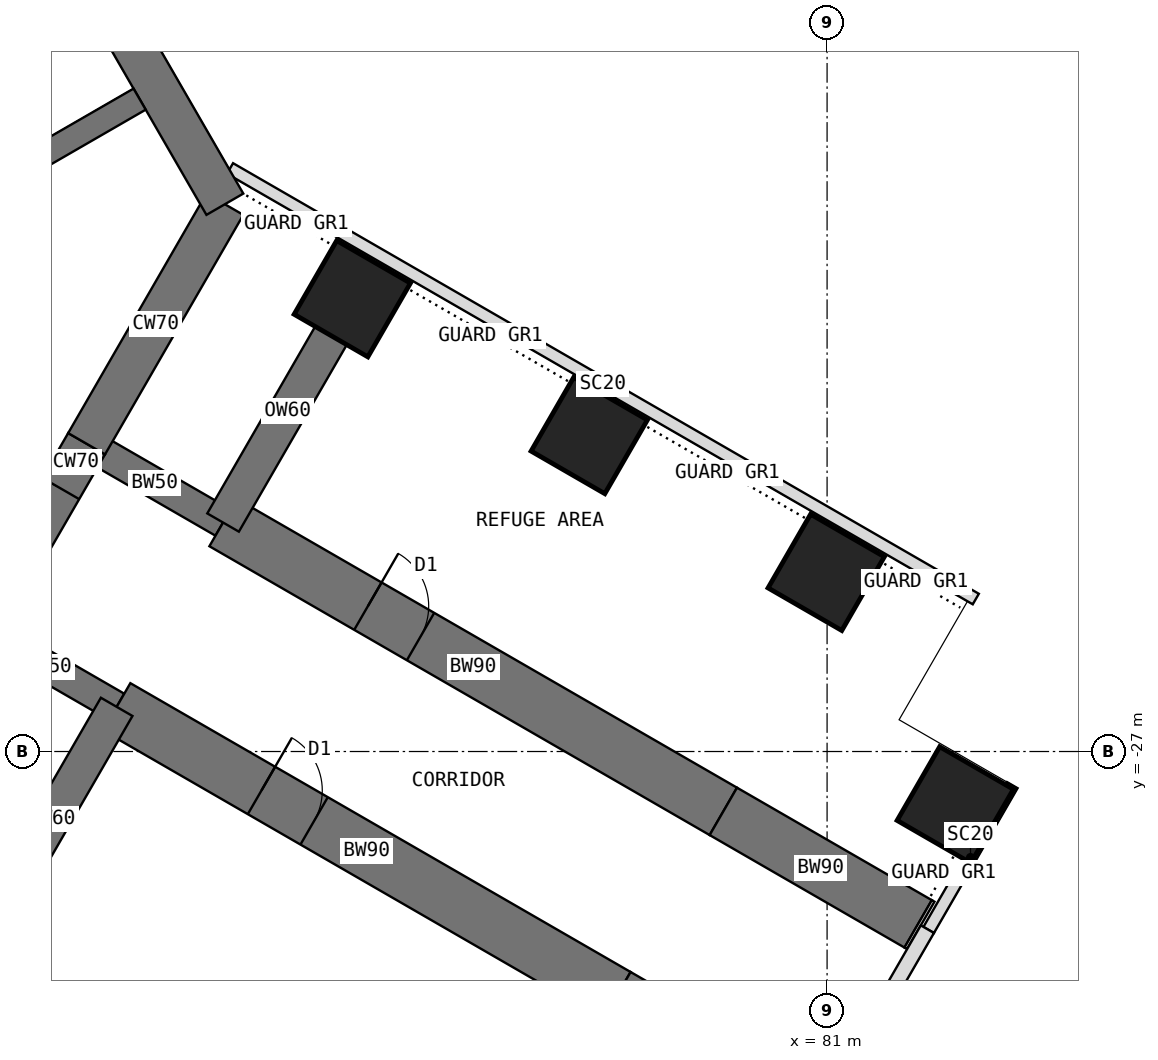
"""IFC4 building model, lengths in metres.
Left out: names, types, materials, properties, quantities, classifications, styles, units other than length and angle.
Written with IfcOpenShell. Run it as: python <this file> out.ifc"""

import sys

from ifc_helpers import new_model, si_unit, direction, frame, frame_2d, origin, origin_2d, place, context, subcontext, project, spatial, rectangle, extrude, element, fill, save


model = new_model("IFC4")
c1 = context("Model", 3, precision=1e-05, world=origin(), true_north=direction((0.0, 1.0)))
c2 = subcontext(c1, "Body", "Model", "MODEL_VIEW")
j1 = project(units=[si_unit("LENGTHUNIT", "METRE"), si_unit("PLANEANGLEUNIT", "RADIAN")], contexts=[c1])
p1 = place(None, origin())
s1 = spatial("IfcSite", under=j1, at=p1, CompositionType="ELEMENT")
p2 = place(p1, origin())
s2 = spatial("IfcBuilding", under=s1, at=p2, CompositionType="ELEMENT")
p3 = place(p2, frame((0.0, 0.0, 92.5)))
s3 = spatial("IfcBuildingStorey", under=s2, at=p3, CompositionType="ELEMENT", Elevation=92.5)
p4 = place(p3, frame((67.072, -24.97, 0.0), z_axis=(0.0, 0.0, 1.0), x_axis=(0.500010275428, 0.866019471182, 0.0)))
e1 = element("IfcWall", 1, at=p4, inside=s3, PredefinedType="SHEAR", context=c2, shape_type="SweptSolid", body=[
    extrude(rectangle(XDim=3.5, YDim=0.7, at=frame_2d((1.75, 0.0))), origin(), (0.0, 0.0, 1.0), 5.0),
])
p5 = place(p4, frame((0.85, 0.0, 0.0)))
e2 = element("IfcOpeningElement", 2, at=p5, cuts=e1, PredefinedType="OPENING", context=c2, shape_type="SweptSolid", body=[
    extrude(rectangle(XDim=1.8, YDim=2.1, at=frame_2d((0.9, 1.05))), frame((0.0, 0.36, 0.0), z_axis=(0.0, -1.0, 0.0), x_axis=(1.0, 0.0, 0.0)), (0.0, 0.0, 1.0), 0.72),
])
p6 = place(p3, frame((68.822, -21.939, 0.0), z_axis=(0.0, 0.0, 1.0), x_axis=(0.500024481964, 0.866011268655, 0.0)))
e3 = element("IfcWall", 3, at=p6, inside=s3, PredefinedType="SHEAR", context=c2, shape_type="SweptSolid", body=[
    extrude(rectangle(XDim=4.548, YDim=0.7, at=frame_2d((2.274, 0.0))), origin(), (0.0, 0.0, 1.0), 5.0),
])
p7 = place(p3, frame((71.096, -18.0, 0.0), z_axis=(0.0, 0.0, 1.0), x_axis=(-0.500005998175, 0.866021940709, 0.0)))
e4 = element("IfcWall", 4, at=p7, inside=s3, PredefinedType="SHEAR", context=c2, shape_type="SweptSolid", body=[
    extrude(rectangle(XDim=12.596, YDim=0.7, at=frame_2d((6.298, 0.0))), origin(), (0.0, 0.0, 1.0), 5.0),
])
p8 = place(p3, frame((68.822, -21.939, 0.0), z_axis=(0.0, 0.0, 1.0), x_axis=(0.866072649678, -0.499918158782, 0.0)))
e5 = element("IfcWall", 5, at=p8, inside=s3, PredefinedType="SHEAR", context=c2, shape_type="SweptSolid", body=[
    extrude(rectangle(XDim=2.592, YDim=0.5, at=frame_2d((1.296, 0.0))), origin(), (0.0, 0.0, 1.0), 5.0),
])
p9 = place(p3, frame((71.066, -23.234, 0.0), z_axis=(0.0, 0.0, 1.0), x_axis=(0.86602681393, -0.499997557548, 0.0)))
e6 = element("IfcWall", 6, at=p9, inside=s3, PredefinedType="SHEAR", context=c2, shape_type="SweptSolid", body=[
    extrude(rectangle(XDim=9.5, YDim=0.9, at=frame_2d((4.75, 0.0))), origin(), (0.0, 0.0, 1.0), 5.0),
])
p10 = place(p9, frame((2.75, 0.0, 0.0)))
e7 = element("IfcOpeningElement", 7, at=p10, cuts=e6, PredefinedType="OPENING", context=c2, shape_type="SweptSolid", body=[
    extrude(rectangle(XDim=1.0, YDim=2.1, at=frame_2d((0.5, 1.05))), frame((0.0, 0.46, 0.0), z_axis=(0.0, -1.0, 0.0), x_axis=(1.0, 0.0, 0.0)), (0.0, 0.0, 1.0), 0.92),
])
p11 = place(p3, frame((79.294, -27.984, 0.0), z_axis=(0.0, 0.0, 1.0), x_axis=(0.866000971088, -0.500042316284, 0.0)))
e8 = element("IfcWall", 8, at=p11, inside=s3, PredefinedType="SHEAR", context=c2, shape_type="SweptSolid", body=[
    extrude(rectangle(XDim=3.7, YDim=0.9, at=frame_2d((1.85, 0.0))), origin(), (0.0, 0.0, 1.0), 5.0),
])
p12 = place(p3, frame((67.072, -24.97, 0.0), z_axis=(0.0, 0.0, 1.0), x_axis=(0.866031863473, -0.499988811324, 0.0)))
e9 = element("IfcWall", 9, at=p12, inside=s3, PredefinedType="SHEAR", context=c2, shape_type="SweptSolid", body=[
    extrude(rectangle(XDim=2.592, YDim=0.5, at=frame_2d((1.296, 0.0))), origin(), (0.0, 0.0, 1.0), 5.0),
])
p13 = place(p3, frame((69.316, -26.266, 0.0), z_axis=(0.0, 0.0, 1.0), x_axis=(0.86602681393, -0.499997557548, 0.0)))
e10 = element("IfcWall", 10, at=p13, inside=s3, PredefinedType="SHEAR", context=c2, shape_type="SweptSolid", body=[
    extrude(rectangle(XDim=9.5, YDim=0.9, at=frame_2d((4.75, 0.0))), origin(), (0.0, 0.0, 1.0), 5.0),
])
p14 = place(p13, frame((2.75, 0.0, 0.0)))
e11 = element("IfcOpeningElement", 11, at=p14, cuts=e10, PredefinedType="OPENING", context=c2, shape_type="SweptSolid", body=[
    extrude(rectangle(XDim=1.0, YDim=2.1, at=frame_2d((0.5, 1.05))), frame((0.0, 0.46, 0.0), z_axis=(0.0, -1.0, 0.0), x_axis=(1.0, 0.0, 0.0)), (0.0, 0.0, 1.0), 0.92),
])
p15 = place(p3, frame((77.544, -31.016, 0.0), z_axis=(0.0, 0.0, 1.0), x_axis=(0.866029545028, -0.499992827086, 0.0)))
e12 = element("IfcWall", 12, at=p15, inside=s3, PredefinedType="SHEAR", context=c2, shape_type="SweptSolid", body=[
    extrude(rectangle(XDim=3.7, YDim=0.9, at=frame_2d((1.85, 0.0))), origin(), (0.0, 0.0, 1.0), 5.0),
])
for number, where, z_axis, x_axis in (
    (13, (73.191, -19.554, 0.0), (0.0, 0.0, 1.0), (0.5, 0.866, 0.0)),
    (14, (77.088, -21.804, 0.0), (0.0, 0.0, 1.0), (0.5, 0.866, 0.0)),
    (15, (80.986, -24.054, 0.0), (0.0, 0.0, 1.0), (0.5, 0.866, 0.0)),
    (16, (83.108, -27.877, 0.0), (0.0, 0.0, 1.0), (0.5, 0.866, 0.0)),
):
    element("IfcColumn", number, at=place(p3, frame(where, z_axis=z_axis, x_axis=x_axis)), inside=s3, PredefinedType="COLUMN", context=c2, shape_type="SweptSolid", body=[
        extrude(rectangle(XDim=1.4, YDim=1.4, at=origin_2d()), origin(), (0.0, 0.0, 1.0), 5.0),
    ])
for number, where, z_axis, x_axis in (
    (17, (71.066, -23.234, 0.0), (0.0, 0.0, 1.0), (0.5, 0.866, 0.0)),
    (18, (69.316, -26.266, 0.0), (0.0, 0.0, 1.0), (-0.5, -0.866, 0.0)),
):
    element("IfcWall", number, at=place(p3, frame(where, z_axis=z_axis, x_axis=x_axis)), inside=s3, PredefinedType="SHEAR", context=c2, shape_type="SweptSolid", body=[
        extrude(rectangle(XDim=4.25, YDim=0.6, at=frame_2d((2.125, 0.0))), origin(), (0.0, 0.0, 1.0), 5.0),
    ])
for number, where, z_axis, x_axis in (
    (19, (71.18, -17.411, 0.0), (0.0, 0.0, 1.0), (0.866, -0.5, 0.0)),
    (20, (76.596, -36.357, 0.0), (0.0, 0.0, 1.0), (-0.866, 0.5, 0.0)),
):
    element("IfcWall", number, at=place(p3, frame(where, z_axis=z_axis, x_axis=x_axis)), inside=s3, PredefinedType="USERDEFINED", context=c2, shape_type="SweptSolid", body=[
        extrude(rectangle(XDim=14.163, YDim=0.2, at=frame_2d((7.082, 0.0))), origin(), (0.0, 0.0, 1.0), 4.8),
    ])
p16 = place(p3, frame((80.899, -32.953, 0.0), z_axis=(0.0, 0.0, 1.0), x_axis=(0.499980071345, 0.866036909293, 0.0)))
e21 = element("IfcWall", 21, at=p16, inside=s3, PredefinedType="STANDARD", context=c2, shape_type="SweptSolid", body=[
    extrude(rectangle(XDim=3.5, YDim=0.25, at=frame_2d((1.75, 0.0))), origin(), (0.0, 0.0, 1.0), 4.8),
])
p17 = place(p3, frame((82.671, -29.935, 0.0), z_axis=(0.0, 0.0, 1.0), x_axis=(0.499996545922, 0.866027397988, 0.0)))
e22 = element("IfcWall", 22, at=p17, inside=s3, PredefinedType="USERDEFINED", context=c2, shape_type="SweptSolid", body=[
    extrude(rectangle(XDim=2.75, YDim=0.2, at=frame_2d((1.375, 0.0))), origin(), (0.0, 0.0, 1.0), 4.8),
])
p18 = place(p3, frame((82.498, -29.834, 0.0), z_axis=(0.0, 0.0, 1.0), x_axis=(0.867642581652, -0.497188445666, 0.0)))
e23 = element("IfcWall", 23, at=p18, inside=s3, PredefinedType="PARTITIONING", context=c2, shape_type="SweptSolid", body=[
    extrude(rectangle(XDim=0.05, YDim=0.9, at=frame_2d((0.025, 0.0))), origin(), (0.0, 0.0, 1.0), 4.8),
])
p19 = place(p3, frame((64.62, -19.201, 0.0), z_axis=(0.0, 0.0, 1.0), x_axis=(0.866023886965, 0.500002627198, 0.0)))
e24 = element("IfcWall", 24, at=p19, inside=s3, PredefinedType="SHEAR", context=c2, shape_type="SweptSolid", body=[
    extrude(rectangle(XDim=5.858, YDim=0.4, at=frame_2d((2.929, 0.0))), origin(), (0.0, 0.0, 1.0), 5.0),
])
p20 = place(p5, origin())
e25 = element("IfcDoor", 25, at=p20, inside=s3, OperationType="DOUBLE_DOOR_DOUBLE_SWING", PredefinedType="DOOR", context=c2, shape_type="SweptSolid", body=[
    extrude(rectangle(XDim=1.72, YDim=2.06, at=frame_2d((0.9, 1.03))), frame((0.0, 0.025, 0.0), z_axis=(0.0, -1.0, 0.0), x_axis=(1.0, 0.0, 0.0)), (0.0, 0.0, 1.0), 0.05),
    extrude(rectangle(XDim=0.04, YDim=2.1, at=frame_2d((0.02, 1.05))), frame((0.0, 0.35, 0.0), z_axis=(0.0, -1.0, 0.0), x_axis=(1.0, 0.0, 0.0)), (0.0, 0.0, 1.0), 0.699),
    extrude(rectangle(XDim=0.04, YDim=2.1, at=frame_2d((1.78, 1.05))), frame((0.0, 0.35, 0.0), z_axis=(0.0, -1.0, 0.0), x_axis=(1.0, 0.0, 0.0)), (0.0, 0.0, 1.0), 0.699),
    extrude(rectangle(XDim=1.72, YDim=0.04, at=frame_2d((0.9, 2.08))), frame((0.0, 0.35, 0.0), z_axis=(0.0, -1.0, 0.0), x_axis=(1.0, 0.0, 0.0)), (0.0, 0.0, 1.0), 0.699),
])
fill(e2, e25)
p21 = place(p10, origin())
e26 = element("IfcDoor", 26, at=p21, inside=s3, OperationType="SINGLE_SWING_LEFT", PredefinedType="DOOR", context=c2, shape_type="SweptSolid", body=[
    extrude(rectangle(XDim=0.92, YDim=2.06, at=frame_2d((0.5, 1.03))), frame((0.0, 0.025, 0.0), z_axis=(0.0, -1.0, 0.0), x_axis=(1.0, 0.0, 0.0)), (0.0, 0.0, 1.0), 0.05),
    extrude(rectangle(XDim=0.04, YDim=2.1, at=frame_2d((0.02, 1.05))), frame((0.0, 0.45, 0.0), z_axis=(0.0, -1.0, 0.0), x_axis=(1.0, 0.0, 0.0)), (0.0, 0.0, 1.0), 0.899),
    extrude(rectangle(XDim=0.04, YDim=2.1, at=frame_2d((0.98, 1.05))), frame((0.0, 0.45, 0.0), z_axis=(0.0, -1.0, 0.0), x_axis=(1.0, 0.0, 0.0)), (0.0, 0.0, 1.0), 0.899),
    extrude(rectangle(XDim=0.92, YDim=0.04, at=frame_2d((0.5, 2.08))), frame((0.0, 0.45, 0.0), z_axis=(0.0, -1.0, 0.0), x_axis=(1.0, 0.0, 0.0)), (0.0, 0.0, 1.0), 0.899),
])
fill(e7, e26)
p22 = place(p14, origin())
e27 = element("IfcDoor", 27, at=p22, inside=s3, OperationType="SINGLE_SWING_LEFT", PredefinedType="DOOR", context=c2, shape_type="SweptSolid", body=[
    extrude(rectangle(XDim=0.92, YDim=2.06, at=frame_2d((0.5, 1.03))), frame((0.0, 0.025, 0.0), z_axis=(0.0, -1.0, 0.0), x_axis=(1.0, 0.0, 0.0)), (0.0, 0.0, 1.0), 0.05),
    extrude(rectangle(XDim=0.04, YDim=2.1, at=frame_2d((0.02, 1.05))), frame((0.0, 0.45, 0.0), z_axis=(0.0, -1.0, 0.0), x_axis=(1.0, 0.0, 0.0)), (0.0, 0.0, 1.0), 0.899),
    extrude(rectangle(XDim=0.04, YDim=2.1, at=frame_2d((0.98, 1.05))), frame((0.0, 0.45, 0.0), z_axis=(0.0, -1.0, 0.0), x_axis=(1.0, 0.0, 0.0)), (0.0, 0.0, 1.0), 0.899),
    extrude(rectangle(XDim=0.92, YDim=0.04, at=frame_2d((0.5, 2.08))), frame((0.0, 0.45, 0.0), z_axis=(0.0, -1.0, 0.0), x_axis=(1.0, 0.0, 0.0)), (0.0, 0.0, 1.0), 0.899),
])
fill(e11, e27)
save(model, sys.argv[1])
